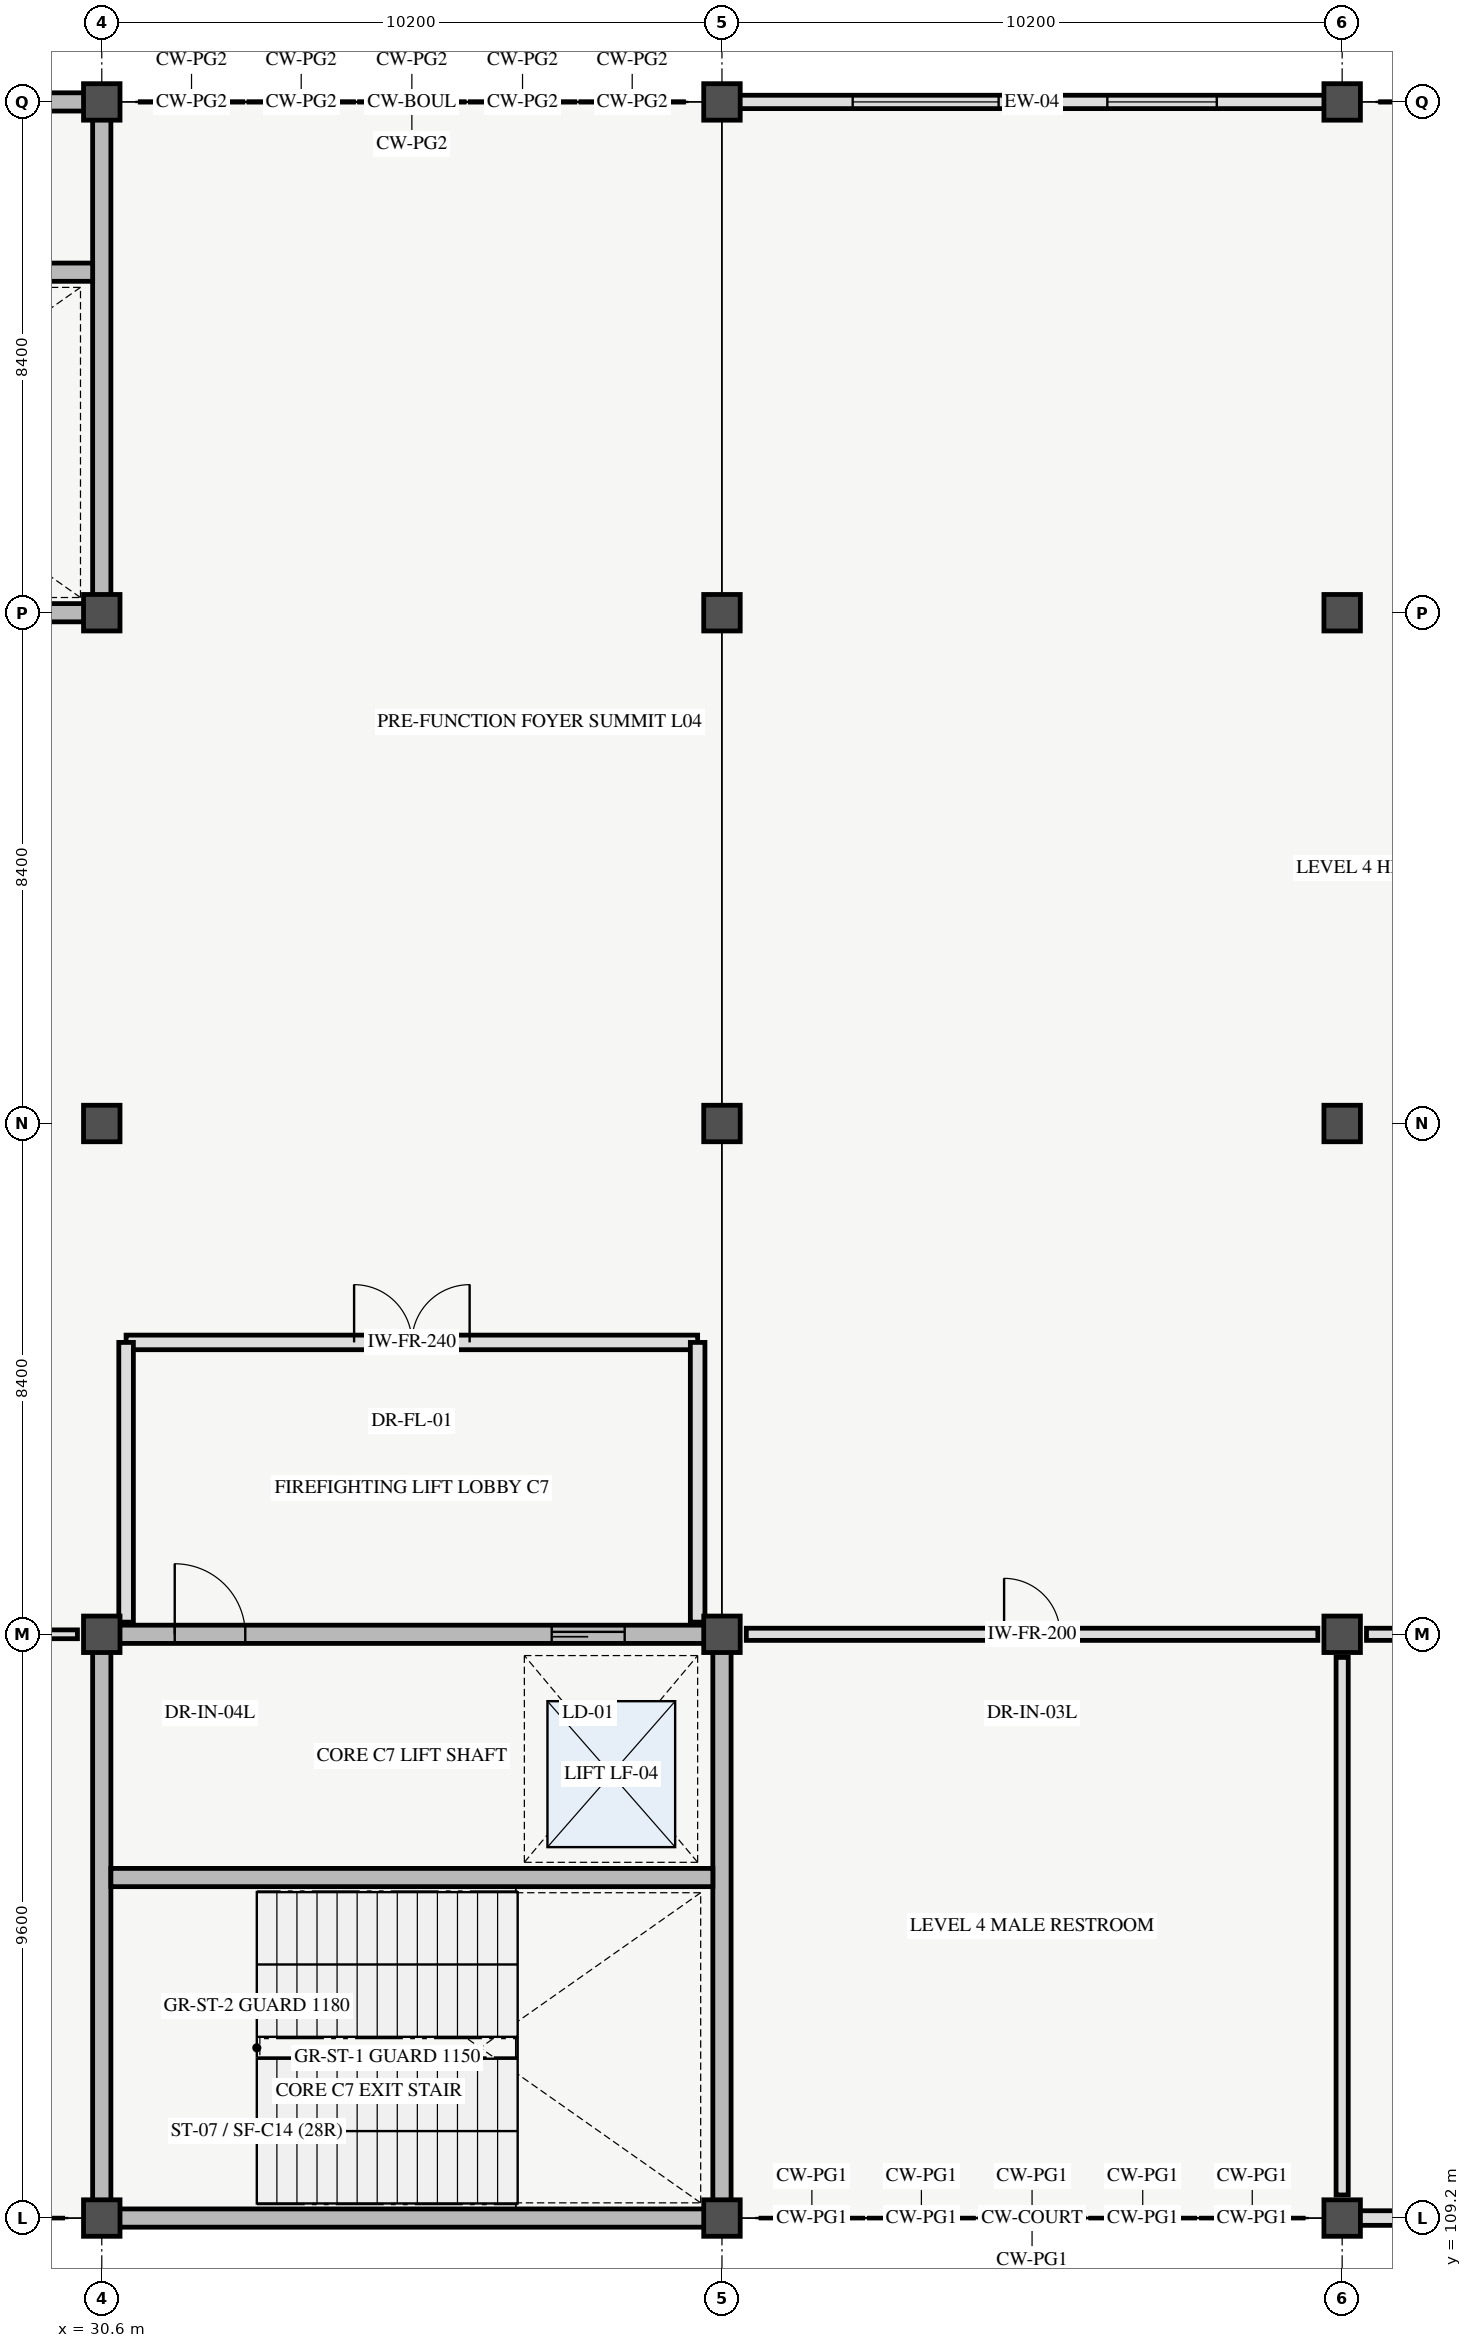
"""IFC4 building model, lengths in metres.
Left out: names, types, materials, properties, quantities, classifications, styles, units other than length and angle.
Written with IfcOpenShell. Run it as: python <this file> out.ifc"""

import sys

from ifc_helpers import new_model, si_unit, direction, frame, frame_2d, origin, origin_2d, place, context, subcontext, project, spatial, rectangle, extrude, element, fill, save


model = new_model("IFC4")
c1 = context("Model", 3, precision=1e-05, world=origin(), true_north=direction((0.0, 1.0)))
c2 = subcontext(c1, "Body", "Model", "MODEL_VIEW")
j1 = project(units=[si_unit("LENGTHUNIT", "METRE"), si_unit("PLANEANGLEUNIT", "RADIAN")], contexts=[c1])
p1 = place(None, origin())
s1 = spatial("IfcSite", under=j1, at=p1, CompositionType="ELEMENT")
p2 = place(p1, origin())
s2 = spatial("IfcBuilding", under=s1, at=p2, CompositionType="ELEMENT")
p3 = place(p2, frame((0.0, 0.0, 19.2)))
s3 = spatial("IfcBuildingStorey", under=s2, at=p3, CompositionType="ELEMENT", Elevation=19.2)
for number, where, z_axis, x_axis in (
    (1, (30.6, 109.2, 0.0), (0.0, 0.0, 1.0), (1.0, 0.0, 0.0)),
    (2, (30.6, 118.8, 0.0), (0.0, 0.0, 1.0), (1.0, 0.0, 0.0)),
    (3, (30.6, 127.2, 0.0), (0.0, 0.0, 1.0), (1.0, 0.0, 0.0)),
    (4, (30.6, 135.6, 0.0), (0.0, 0.0, 1.0), (1.0, 0.0, 0.0)),
    (5, (30.6, 144.0, 0.0), (0.0, 0.0, 1.0), (1.0, 0.0, 0.0)),
    (6, (40.8, 109.2, 0.0), (0.0, 0.0, 1.0), (1.0, 0.0, 0.0)),
    (7, (40.8, 118.8, 0.0), (0.0, 0.0, 1.0), (1.0, 0.0, 0.0)),
    (8, (40.8, 127.2, 0.0), (0.0, 0.0, 1.0), (1.0, 0.0, 0.0)),
    (9, (40.8, 135.6, 0.0), (0.0, 0.0, 1.0), (1.0, 0.0, 0.0)),
    (10, (40.8, 144.0, 0.0), (0.0, 0.0, 1.0), (1.0, 0.0, 0.0)),
    (11, (51.0, 109.2, 0.0), (0.0, 0.0, 1.0), (1.0, 0.0, 0.0)),
    (12, (51.0, 118.8, 0.0), (0.0, 0.0, 1.0), (1.0, 0.0, 0.0)),
    (13, (51.0, 127.2, 0.0), (0.0, 0.0, 1.0), (1.0, 0.0, 0.0)),
    (14, (51.0, 135.6, 0.0), (0.0, 0.0, 1.0), (1.0, 0.0, 0.0)),
    (15, (51.0, 144.0, 0.0), (0.0, 0.0, 1.0), (1.0, 0.0, 0.0)),
):
    element("IfcColumn", number, at=place(p3, frame(where, z_axis=z_axis, x_axis=x_axis)), inside=s3, PredefinedType="COLUMN", context=c2, shape_type="SweptSolid", body=[
        extrude(rectangle(XDim=0.6, YDim=0.6, at=origin_2d()), origin(), (0.0, 0.0, 1.0), 4.2),
    ])
p4 = place(p3, frame((30.6, 109.2, 0.0), z_axis=(0.0, 0.0, 1.0), x_axis=(1.0, 0.0, 0.0)))
e16 = element("IfcWall", 16, at=p4, inside=s3, PredefinedType="SHEAR", context=c2, shape_type="SweptSolid", body=[
    extrude(rectangle(XDim=10.2, YDim=0.3, at=frame_2d((5.1, 0.0))), origin(), (0.0, 0.0, 1.0), 4.2),
])
p5 = place(p3, frame((30.6, 118.8, 0.0), z_axis=(0.0, 0.0, 1.0), x_axis=(1.0, 0.0, 0.0)))
e17 = element("IfcWall", 17, at=p5, inside=s3, PredefinedType="SHEAR", context=c2, shape_type="SweptSolid", body=[
    extrude(rectangle(XDim=10.2, YDim=0.3, at=frame_2d((5.1, 0.0))), origin(), (0.0, 0.0, 1.0), 4.2),
])
p6 = place(p5, frame((1.2, 0.0, 0.0)))
e18 = element("IfcOpeningElement", 18, at=p6, cuts=e17, PredefinedType="OPENING", context=c2, shape_type="SweptSolid", body=[
    extrude(rectangle(XDim=1.16, YDim=2.2, at=frame_2d((0.58, 1.1))), frame((0.0, 0.16, 0.0), z_axis=(0.0, -1.0, 0.0), x_axis=(1.0, 0.0, 0.0)), (0.0, 0.0, 1.0), 0.32),
])
p7 = place(p5, frame((7.4, 0.0, 0.0)))
e19 = element("IfcOpeningElement", 19, at=p7, cuts=e17, PredefinedType="OPENING", context=c2, shape_type="SweptSolid", body=[
    extrude(rectangle(XDim=1.2, YDim=2.25, at=frame_2d((0.6, 1.125))), frame((0.0, 0.16, 0.0), z_axis=(0.0, -1.0, 0.0), x_axis=(1.0, 0.0, 0.0)), (0.0, 0.0, 1.0), 0.32),
])
for number, where, z_axis, x_axis in (
    (20, (30.6, 109.2, 0.0), (0.0, 0.0, 1.0), (0.0, 1.0, 0.0)),
    (21, (40.8, 109.2, 0.0), (0.0, 0.0, 1.0), (0.0, 1.0, 0.0)),
):
    element("IfcWall", number, at=place(p3, frame(where, z_axis=z_axis, x_axis=x_axis)), inside=s3, PredefinedType="SHEAR", context=c2, shape_type="SweptSolid", body=[
        extrude(rectangle(XDim=9.6, YDim=0.3, at=frame_2d((4.8, 0.0))), origin(), (0.0, 0.0, 1.0), 4.2),
    ])
p8 = place(p3, frame((41.04, 144.0, 0.0), z_axis=(0.0, 0.0, 1.0), x_axis=(1.0, 0.0, 0.0)))
e22 = element("IfcWall", 22, at=p8, inside=s3, PredefinedType="STANDARD", context=c2, shape_type="SweptSolid", body=[
    extrude(rectangle(XDim=9.72, YDim=0.22, at=frame_2d((4.86, 0.0))), origin(), (0.0, 0.0, 1.0), 3.06),
])
p9 = place(p8, frame((1.91, 0.0, 0.7)))
e23 = element("IfcOpeningElement", 23, at=p9, cuts=e22, PredefinedType="OPENING", context=c2, shape_type="SweptSolid", body=[
    extrude(rectangle(XDim=2.4, YDim=2.1, at=frame_2d((1.2, 1.05))), frame((0.0, 0.12, 0.0), z_axis=(0.0, -1.0, 0.0), x_axis=(1.0, 0.0, 0.0)), (0.0, 0.0, 1.0), 0.24),
])
p10 = place(p8, frame((6.098, 0.0, 0.85)))
e24 = element("IfcOpeningElement", 24, at=p10, cuts=e22, PredefinedType="OPENING", context=c2, shape_type="SweptSolid", body=[
    extrude(rectangle(XDim=1.8, YDim=1.8, at=frame_2d((0.9, 0.9))), frame((0.0, 0.12, 0.0), z_axis=(0.0, -1.0, 0.0), x_axis=(1.0, 0.0, 0.0)), (0.0, 0.0, 1.0), 0.24),
])
p11 = place(p3, frame((51.24, 109.2, 0.0), z_axis=(0.0, 0.0, 1.0), x_axis=(1.0, 0.0, 0.0)))
e25 = element("IfcWall", 25, at=p11, inside=s3, PredefinedType="STANDARD", context=c2, shape_type="SweptSolid", body=[
    extrude(rectangle(XDim=9.72, YDim=0.24, at=frame_2d((4.86, 0.0))), origin(), (0.0, 0.0, 1.0), 3.06),
])
p12 = place(p11, frame((3.06, 0.0, 0.9)))
e26 = element("IfcOpeningElement", 26, at=p12, cuts=e25, PredefinedType="OPENING", context=c2, shape_type="SweptSolid", body=[
    extrude(rectangle(XDim=3.6, YDim=2.1, at=frame_2d((1.8, 1.05))), frame((0.0, 0.13, 0.0), z_axis=(0.0, -1.0, 0.0), x_axis=(1.0, 0.0, 0.0)), (0.0, 0.0, 1.0), 0.26),
])
p13 = place(p3, frame((30.75, 114.8, 0.0), z_axis=(0.0, 0.0, 1.0), x_axis=(1.0, 0.0, 0.0)))
e27 = element("IfcWall", 27, at=p13, inside=s3, PredefinedType="SHEAR", context=c2, shape_type="SweptSolid", body=[
    extrude(rectangle(XDim=9.9, YDim=0.3, at=frame_2d((4.95, 0.0))), origin(), (0.0, 0.0, 1.0), 4.2),
])
p14 = place(p3, frame((20.4, 135.6, 0.0), z_axis=(0.0, 0.0, 1.0), x_axis=(1.0, 0.0, 0.0)))
e28 = element("IfcWall", 28, at=p14, inside=s3, PredefinedType="SHEAR", context=c2, shape_type="SweptSolid", body=[
    extrude(rectangle(XDim=10.2, YDim=0.3, at=frame_2d((5.1, 0.0))), origin(), (0.0, 0.0, 1.0), 4.2),
])
p15 = place(p14, frame((0.92, 0.0, 0.0)))
e29 = element("IfcOpeningElement", 29, at=p15, cuts=e28, PredefinedType="OPENING", context=c2, shape_type="SweptSolid", body=[
    extrude(rectangle(XDim=1.16, YDim=2.2, at=frame_2d((0.58, 1.1))), frame((0.0, 0.16, 0.0), z_axis=(0.0, -1.0, 0.0), x_axis=(1.0, 0.0, 0.0)), (0.0, 0.0, 1.0), 0.32),
])
p16 = place(p3, frame((20.4, 144.0, 0.0), z_axis=(0.0, 0.0, 1.0), x_axis=(1.0, 0.0, 0.0)))
e30 = element("IfcWall", 30, at=p16, inside=s3, PredefinedType="SHEAR", context=c2, shape_type="SweptSolid", body=[
    extrude(rectangle(XDim=10.2, YDim=0.3, at=frame_2d((5.1, 0.0))), origin(), (0.0, 0.0, 1.0), 4.2),
])
p17 = place(p3, frame((30.6, 135.6, 0.0), z_axis=(0.0, 0.0, 1.0), x_axis=(0.0, 1.0, 0.0)))
e31 = element("IfcWall", 31, at=p17, inside=s3, PredefinedType="SHEAR", context=c2, shape_type="SweptSolid", body=[
    extrude(rectangle(XDim=8.4, YDim=0.3, at=frame_2d((4.2, 0.0))), origin(), (0.0, 0.0, 1.0), 4.2),
])
p18 = place(p3, frame((20.55, 141.2, 0.0), z_axis=(0.0, 0.0, 1.0), x_axis=(1.0, 0.0, 0.0)))
e32 = element("IfcWall", 32, at=p18, inside=s3, PredefinedType="SHEAR", context=c2, shape_type="SweptSolid", body=[
    extrude(rectangle(XDim=9.9, YDim=0.3, at=frame_2d((4.95, 0.0))), origin(), (0.0, 0.0, 1.0), 4.2),
])
p19 = place(p3, frame((31.0, 123.6, 0.0), z_axis=(0.0, 0.0, 1.0), x_axis=(1.0, 0.0, 0.0)))
e33 = element("IfcWall", 33, at=p19, inside=s3, PredefinedType="PARTITIONING", context=c2, shape_type="SweptSolid", body=[
    extrude(rectangle(XDim=9.4, YDim=0.24, at=frame_2d((4.7, 0.0))), origin(), (0.0, 0.0, 1.0), 3.06),
])
p20 = place(p19, frame((3.75, 0.0, 0.0)))
e34 = element("IfcOpeningElement", 34, at=p20, cuts=e33, PredefinedType="OPENING", context=c2, shape_type="SweptSolid", body=[
    extrude(rectangle(XDim=1.9, YDim=2.25, at=frame_2d((0.95, 1.125))), frame((0.0, 0.13, 0.0), z_axis=(0.0, -1.0, 0.0), x_axis=(1.0, 0.0, 0.0)), (0.0, 0.0, 1.0), 0.26),
])
for number, where, z_axis, x_axis in (
    (35, (40.4, 119.0, 0.0), (0.0, 0.0, 1.0), (0.0, 1.0, 0.0)),
    (36, (31.0, 119.0, 0.0), (0.0, 0.0, 1.0), (0.0, 1.0, 0.0)),
):
    element("IfcWall", number, at=place(p3, frame(where, z_axis=z_axis, x_axis=x_axis)), inside=s3, PredefinedType="PARTITIONING", context=c2, shape_type="SweptSolid", body=[
        extrude(rectangle(XDim=4.6, YDim=0.24, at=frame_2d((2.3, 0.0))), origin(), (0.0, 0.0, 1.0), 3.06),
    ])
p21 = place(p3, frame((20.8, 118.8, 0.0), z_axis=(0.0, 0.0, 1.0), x_axis=(1.0, 0.0, 0.0)))
e37 = element("IfcWall", 37, at=p21, inside=s3, PredefinedType="PARTITIONING", context=c2, shape_type="SweptSolid", body=[
    extrude(rectangle(XDim=9.4, YDim=0.145, at=frame_2d((4.7, 0.0))), origin(), (0.0, 0.0, 1.0), 3.06),
])
p22 = place(p21, frame((4.125, 0.0, 0.0)))
e38 = element("IfcOpeningElement", 38, at=p22, cuts=e37, PredefinedType="OPENING", context=c2, shape_type="SweptSolid", body=[
    extrude(rectangle(XDim=1.15, YDim=2.2, at=frame_2d((0.575, 1.1))), frame((0.0, 0.083, 0.0), z_axis=(0.0, -1.0, 0.0), x_axis=(1.0, 0.0, 0.0)), (0.0, 0.0, 1.0), 0.165),
])
p23 = place(p3, frame((41.2, 118.8, 0.0), z_axis=(0.0, 0.0, 1.0), x_axis=(1.0, 0.0, 0.0)))
e39 = element("IfcWall", 39, at=p23, inside=s3, PredefinedType="PARTITIONING", context=c2, shape_type="SweptSolid", body=[
    extrude(rectangle(XDim=9.4, YDim=0.2, at=frame_2d((4.7, 0.0))), origin(), (0.0, 0.0, 1.0), 3.06),
])
p24 = place(p23, frame((4.24, 0.0, 0.0)))
e40 = element("IfcOpeningElement", 40, at=p24, cuts=e39, PredefinedType="OPENING", context=c2, shape_type="SweptSolid", body=[
    extrude(rectangle(XDim=0.92, YDim=2.1, at=frame_2d((0.46, 1.05))), frame((0.0, 0.11, 0.0), z_axis=(0.0, -1.0, 0.0), x_axis=(1.0, 0.0, 0.0)), (0.0, 0.0, 1.0), 0.22),
])
p25 = place(p3, frame((51.4, 118.8, 0.0), z_axis=(0.0, 0.0, 1.0), x_axis=(1.0, 0.0, 0.0)))
e41 = element("IfcWall", 41, at=p25, inside=s3, PredefinedType="PARTITIONING", context=c2, shape_type="SweptSolid", body=[
    extrude(rectangle(XDim=6.2, YDim=0.2, at=frame_2d((3.1, 0.0))), origin(), (0.0, 0.0, 1.0), 3.06),
])
p26 = place(p25, frame((2.62, 0.0, 0.0)))
e42 = element("IfcOpeningElement", 42, at=p26, cuts=e41, PredefinedType="OPENING", context=c2, shape_type="SweptSolid", body=[
    extrude(rectangle(XDim=0.96, YDim=2.1, at=frame_2d((0.48, 1.05))), frame((0.0, 0.11, 0.0), z_axis=(0.0, -1.0, 0.0), x_axis=(1.0, 0.0, 0.0)), (0.0, 0.0, 1.0), 0.22),
])
p27 = place(p3, frame((51.0, 109.58, 0.0), z_axis=(0.0, 0.0, 1.0), x_axis=(0.0, 1.0, 0.0)))
e43 = element("IfcWall", 43, at=p27, inside=s3, PredefinedType="PARTITIONING", context=c2, shape_type="SweptSolid", body=[
    extrude(rectangle(XDim=8.84, YDim=0.2, at=frame_2d((4.42, 0.0))), origin(), (0.0, 0.0, 1.0), 3.06),
])
p28 = place(p9, origin())
e44 = element("IfcWindow", 44, at=p28, inside=s3, PartitioningType="DOUBLE_PANEL_VERTICAL", PredefinedType="WINDOW", context=c2, shape_type="SweptSolid", body=[
    extrude(rectangle(XDim=2.4, YDim=2.1, at=frame_2d((1.2, 1.05))), frame((0.0, 0.03, 0.0), z_axis=(0.0, -1.0, 0.0), x_axis=(1.0, 0.0, 0.0)), (0.0, 0.0, 1.0), 0.06),
])
fill(e23, e44)
p29 = place(p10, origin())
e45 = element("IfcWindow", 45, at=p29, inside=s3, PartitioningType="DOUBLE_PANEL_VERTICAL", PredefinedType="WINDOW", context=c2, shape_type="SweptSolid", body=[
    extrude(rectangle(XDim=1.8, YDim=1.8, at=frame_2d((0.9, 0.9))), frame((0.0, 0.03, 0.0), z_axis=(0.0, -1.0, 0.0), x_axis=(1.0, 0.0, 0.0)), (0.0, 0.0, 1.0), 0.06),
])
fill(e24, e45)
p30 = place(p6, origin())
e46 = element("IfcDoor", 46, at=p30, inside=s3, OperationType="SINGLE_SWING_LEFT", PredefinedType="DOOR", context=c2, shape_type="SweptSolid", body=[
    extrude(rectangle(XDim=1.16, YDim=2.2, at=frame_2d((0.58, 1.1))), frame((0.0, 0.025, 0.0), z_axis=(0.0, -1.0, 0.0), x_axis=(1.0, 0.0, 0.0)), (0.0, 0.0, 1.0), 0.05),
])
fill(e18, e46)
p31 = place(p7, origin())
e47 = element("IfcDoor", 47, at=p31, inside=s3, OperationType="SLIDING_TO_LEFT", PredefinedType="DOOR", context=c2, shape_type="SweptSolid", body=[
    extrude(rectangle(XDim=1.2, YDim=2.25, at=frame_2d((0.6, 1.125))), frame((0.0, 0.025, 0.0), z_axis=(0.0, -1.0, 0.0), x_axis=(1.0, 0.0, 0.0)), (0.0, 0.0, 1.0), 0.05),
])
fill(e19, e47)
p32 = place(p20, origin())
e48 = element("IfcDoor", 48, at=p32, inside=s3, OperationType="DOUBLE_DOOR_SINGLE_SWING", PredefinedType="DOOR", context=c2, shape_type="SweptSolid", body=[
    extrude(rectangle(XDim=1.9, YDim=2.25, at=frame_2d((0.95, 1.125))), frame((0.0, 0.025, 0.0), z_axis=(0.0, -1.0, 0.0), x_axis=(1.0, 0.0, 0.0)), (0.0, 0.0, 1.0), 0.05),
])
fill(e34, e48)
p33 = place(p24, origin())
e49 = element("IfcDoor", 49, at=p33, inside=s3, OperationType="SINGLE_SWING_LEFT", PredefinedType="DOOR", context=c2, shape_type="SweptSolid", body=[
    extrude(rectangle(XDim=0.92, YDim=2.1, at=frame_2d((0.46, 1.05))), frame((0.0, 0.025, 0.0), z_axis=(0.0, -1.0, 0.0), x_axis=(1.0, 0.0, 0.0)), (0.0, 0.0, 1.0), 0.05),
])
fill(e40, e49)
save(model, sys.argv[1])
